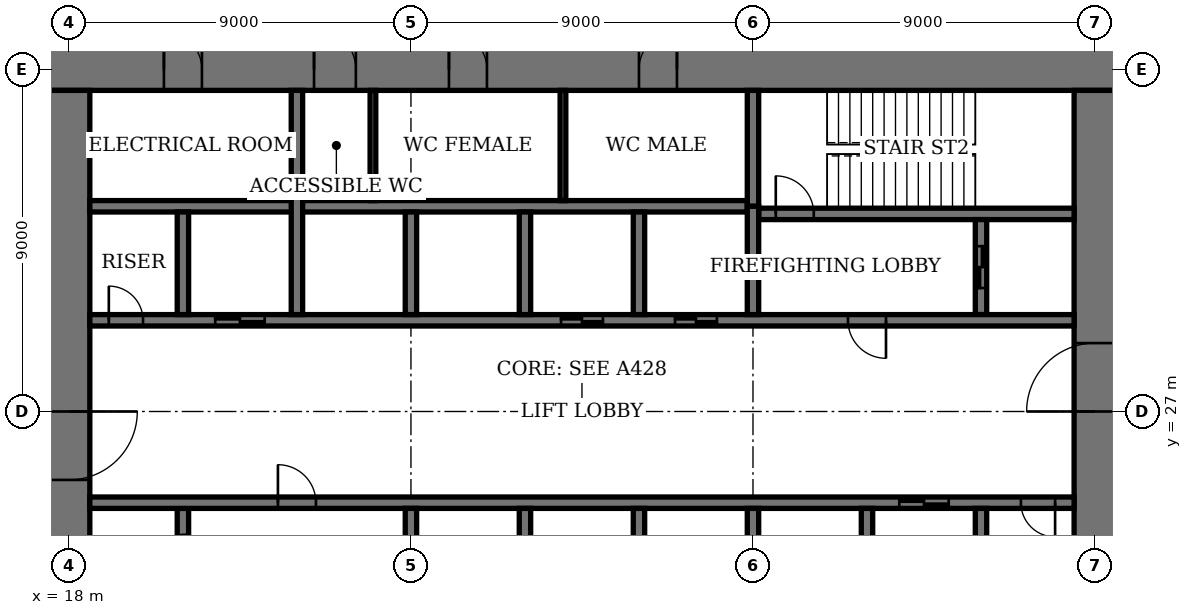
"""IFC4 building model, lengths in metres.
Left out: names, types, materials, properties, quantities, classifications, styles, units other than length and angle.
Written with IfcOpenShell. Run it as: python <this file> out.ifc"""

import sys

from ifc_helpers import new_model, si_unit, direction, frame, frame_2d, origin, place, context, subcontext, project, spatial, rectangle, extrude, element, fill, save


model = new_model("IFC4")
c1 = context("Model", 3, precision=1e-05, world=origin(), true_north=direction((0.0, 1.0)))
c2 = subcontext(c1, "Body", "Model", "MODEL_VIEW")
j1 = project(units=[si_unit("LENGTHUNIT", "METRE"), si_unit("PLANEANGLEUNIT", "RADIAN")], contexts=[c1])
p1 = place(None, origin())
s1 = spatial("IfcSite", under=j1, at=p1, CompositionType="ELEMENT")
p2 = place(p1, origin())
s2 = spatial("IfcBuilding", under=s1, at=p2, CompositionType="ELEMENT")
p3 = place(p2, frame((0.0, 0.0, 105.0)))
s3 = spatial("IfcBuildingStorey", under=s2, at=p3, CompositionType="ELEMENT", Elevation=105.0)
p4 = place(p3, frame((45.55, 36.0, 0.0), z_axis=(0.0, 0.0, 1.0), x_axis=(-1.0, 0.0, 0.0)))
e1 = element("IfcWall", 1, at=p4, inside=s3, PredefinedType="SHEAR", context=c2, shape_type="SweptSolid", body=[
    extrude(rectangle(XDim=28.1, YDim=1.1, at=frame_2d((14.05, 0.0))), origin(), (0.0, 0.0, 1.0), 4.0),
])
p5 = place(p4, frame((11.55, 0.0, 0.0)))
e2 = element("IfcOpeningElement", 2, at=p5, cuts=e1, PredefinedType="OPENING", context=c2, shape_type="SweptSolid", body=[
    extrude(rectangle(XDim=1.0, YDim=2.4, at=frame_2d((0.5, 1.2))), frame((0.0, 0.56, 0.0), z_axis=(0.0, -1.0, 0.0), x_axis=(1.0, 0.0, 0.0)), (0.0, 0.0, 1.0), 1.12),
])
p6 = place(p4, frame((16.55, 0.0, 0.0)))
e3 = element("IfcOpeningElement", 3, at=p6, cuts=e1, PredefinedType="OPENING", context=c2, shape_type="SweptSolid", body=[
    extrude(rectangle(XDim=1.0, YDim=2.4, at=frame_2d((0.5, 1.2))), frame((0.0, 0.56, 0.0), z_axis=(0.0, -1.0, 0.0), x_axis=(1.0, 0.0, 0.0)), (0.0, 0.0, 1.0), 1.12),
])
p7 = place(p4, frame((20.0, 0.0, 0.0)))
e4 = element("IfcOpeningElement", 4, at=p7, cuts=e1, PredefinedType="OPENING", context=c2, shape_type="SweptSolid", body=[
    extrude(rectangle(XDim=1.1, YDim=2.4, at=frame_2d((0.55, 1.2))), frame((0.0, 0.56, 0.0), z_axis=(0.0, -1.0, 0.0), x_axis=(1.0, 0.0, 0.0)), (0.0, 0.0, 1.0), 1.12),
])
p8 = place(p4, frame((24.05, 0.0, 0.0)))
e5 = element("IfcOpeningElement", 5, at=p8, cuts=e1, PredefinedType="OPENING", context=c2, shape_type="SweptSolid", body=[
    extrude(rectangle(XDim=1.0, YDim=2.4, at=frame_2d((0.5, 1.2))), frame((0.0, 0.56, 0.0), z_axis=(0.0, -1.0, 0.0), x_axis=(1.0, 0.0, 0.0)), (0.0, 0.0, 1.0), 1.12),
])
p9 = place(p3, frame((18.0, 35.45, 0.0), z_axis=(0.0, 0.0, 1.0), x_axis=(0.0, -1.0, 0.0)))
e6 = element("IfcWall", 6, at=p9, inside=s3, PredefinedType="SHEAR", context=c2, shape_type="SweptSolid", body=[
    extrude(rectangle(XDim=16.9, YDim=1.1, at=frame_2d((8.45, 0.0))), origin(), (0.0, 0.0, 1.0), 4.0),
])
p10 = place(p9, frame((8.45, 0.0, 0.0)))
e7 = element("IfcOpeningElement", 7, at=p10, cuts=e6, PredefinedType="OPENING", context=c2, shape_type="SweptSolid", body=[
    extrude(rectangle(XDim=1.8, YDim=2.4, at=frame_2d((0.9, 1.2))), frame((0.0, 0.56, 0.0), z_axis=(0.0, -1.0, 0.0), x_axis=(1.0, 0.0, 0.0)), (0.0, 0.0, 1.0), 1.12),
])
p11 = place(p3, frame((45.0, 18.55, 0.0), z_axis=(0.0, 0.0, 1.0), x_axis=(0.0, 1.0, 0.0)))
e8 = element("IfcWall", 8, at=p11, inside=s3, PredefinedType="SHEAR", context=c2, shape_type="SweptSolid", body=[
    extrude(rectangle(XDim=16.9, YDim=1.1, at=frame_2d((8.45, 0.0))), origin(), (0.0, 0.0, 1.0), 4.0),
])
p12 = place(p11, frame((8.45, 0.0, 0.0)))
e9 = element("IfcOpeningElement", 9, at=p12, cuts=e8, PredefinedType="OPENING", context=c2, shape_type="SweptSolid", body=[
    extrude(rectangle(XDim=1.8, YDim=2.4, at=frame_2d((0.9, 1.2))), frame((0.0, 0.56, 0.0), z_axis=(0.0, -1.0, 0.0), x_axis=(1.0, 0.0, 0.0)), (0.0, 0.0, 1.0), 1.12),
])
p13 = place(p3, frame((36.15, 32.2, 0.0), z_axis=(0.0, 0.0, 1.0), x_axis=(1.0, 0.0, 0.0)))
e10 = element("IfcWall", 10, at=p13, inside=s3, PredefinedType="SHEAR", context=c2, shape_type="SweptSolid", body=[
    extrude(rectangle(XDim=8.3, YDim=0.3, at=frame_2d((4.15, 0.0))), origin(), (0.0, 0.0, 1.0), 4.0),
])
p14 = place(p13, frame((0.45, 0.0, 0.0)))
e11 = element("IfcOpeningElement", 11, at=p14, cuts=e10, PredefinedType="OPENING", context=c2, shape_type="SweptSolid", body=[
    extrude(rectangle(XDim=1.0, YDim=2.4, at=frame_2d((0.5, 1.2))), frame((0.0, 0.16, 0.0), z_axis=(0.0, -1.0, 0.0), x_axis=(1.0, 0.0, 0.0)), (0.0, 0.0, 1.0), 0.32),
])
p15 = place(p3, frame((36.0, 32.4, 0.0), z_axis=(0.0, 0.0, 1.0), x_axis=(0.0, 1.0, 0.0)))
e12 = element("IfcWall", 12, at=p15, inside=s3, PredefinedType="SHEAR", context=c2, shape_type="SweptSolid", body=[
    extrude(rectangle(XDim=3.05, YDim=0.3, at=frame_2d((1.525, 0.0))), origin(), (0.0, 0.0, 1.0), 4.0),
])
p16 = place(p3, frame((21.0, 21.95, 0.0), z_axis=(0.0, 0.0, 1.0), x_axis=(0.0, 1.0, 0.0)))
e13 = element("IfcWall", 13, at=p16, inside=s3, PredefinedType="SHEAR", context=c2, shape_type="SweptSolid", body=[
    extrude(rectangle(XDim=2.5, YDim=0.3, at=frame_2d((1.25, 0.0))), origin(), (0.0, 0.0, 1.0), 4.0),
])
p17 = place(p16, frame((0.7, 0.0, 0.0)))
e14 = element("IfcOpeningElement", 14, at=p17, cuts=e13, PredefinedType="OPENING", context=c2, shape_type="SweptSolid", body=[
    extrude(rectangle(XDim=1.1, YDim=2.4, at=frame_2d((0.55, 1.2))), frame((0.0, 0.16, 0.0), z_axis=(0.0, -1.0, 0.0), x_axis=(1.0, 0.0, 0.0)), (0.0, 0.0, 1.0), 0.32),
])
p18 = place(p3, frame((42.0, 29.55, 0.0), z_axis=(0.0, 0.0, 1.0), x_axis=(0.0, 1.0, 0.0)))
e15 = element("IfcWall", 15, at=p18, inside=s3, PredefinedType="SHEAR", context=c2, shape_type="SweptSolid", body=[
    extrude(rectangle(XDim=2.5, YDim=0.3, at=frame_2d((1.25, 0.0))), origin(), (0.0, 0.0, 1.0), 4.0),
])
p19 = place(p18, frame((0.7, 0.0, 0.0)))
e16 = element("IfcOpeningElement", 16, at=p19, cuts=e15, PredefinedType="OPENING", context=c2, shape_type="SweptSolid", body=[
    extrude(rectangle(XDim=1.1, YDim=2.4, at=frame_2d((0.55, 1.2))), frame((0.0, 0.16, 0.0), z_axis=(0.0, -1.0, 0.0), x_axis=(1.0, 0.0, 0.0)), (0.0, 0.0, 1.0), 0.32),
])
p20 = place(p3, frame((18.55, 24.6, 0.0), z_axis=(0.0, 0.0, 1.0), x_axis=(1.0, 0.0, 0.0)))
e17 = element("IfcWall", 17, at=p20, inside=s3, PredefinedType="SHEAR", context=c2, shape_type="SweptSolid", body=[
    extrude(rectangle(XDim=25.9, YDim=0.3, at=frame_2d((12.95, 0.0))), origin(), (0.0, 0.0, 1.0), 4.0),
])
p21 = place(p20, frame((4.95, 0.0, 0.0)))
e18 = element("IfcOpeningElement", 18, at=p21, cuts=e17, PredefinedType="OPENING", context=c2, shape_type="SweptSolid", body=[
    extrude(rectangle(XDim=1.0, YDim=2.4, at=frame_2d((0.5, 1.2))), frame((0.0, 0.16, 0.0), z_axis=(0.0, -1.0, 0.0), x_axis=(1.0, 0.0, 0.0)), (0.0, 0.0, 1.0), 0.32),
])
p22 = place(p20, frame((24.5, 0.0, 0.0)))
e19 = element("IfcOpeningElement", 19, at=p22, cuts=e17, PredefinedType="OPENING", context=c2, shape_type="SweptSolid", body=[
    extrude(rectangle(XDim=0.9, YDim=2.1, at=frame_2d((0.45, 1.05))), frame((0.0, 0.16, 0.0), z_axis=(0.0, -1.0, 0.0), x_axis=(1.0, 0.0, 0.0)), (0.0, 0.0, 1.0), 0.32),
])
p23 = place(p20, frame((21.3, 0.0, 0.0)))
e20 = element("IfcOpeningElement", 20, at=p23, cuts=e17, PredefinedType="OPENING", context=c2, shape_type="SweptSolid", body=[
    extrude(rectangle(XDim=1.3, YDim=2.4, at=frame_2d((0.65, 1.2))), frame((0.0, 0.16, 0.0), z_axis=(0.0, -1.0, 0.0), x_axis=(1.0, 0.0, 0.0)), (0.0, 0.0, 1.0), 0.32),
])
p24 = place(p3, frame((18.55, 29.4, 0.0), z_axis=(0.0, 0.0, 1.0), x_axis=(1.0, 0.0, 0.0)))
e21 = element("IfcWall", 21, at=p24, inside=s3, PredefinedType="SHEAR", context=c2, shape_type="SweptSolid", body=[
    extrude(rectangle(XDim=25.9, YDim=0.3, at=frame_2d((12.95, 0.0))), origin(), (0.0, 0.0, 1.0), 4.0),
])
p25 = place(p24, frame((19.95, 0.0, 0.0)))
e22 = element("IfcOpeningElement", 22, at=p25, cuts=e21, PredefinedType="OPENING", context=c2, shape_type="SweptSolid", body=[
    extrude(rectangle(XDim=1.0, YDim=2.4, at=frame_2d((0.5, 1.2))), frame((0.0, 0.16, 0.0), z_axis=(0.0, -1.0, 0.0), x_axis=(1.0, 0.0, 0.0)), (0.0, 0.0, 1.0), 0.32),
])
p26 = place(p24, frame((0.5, 0.0, 0.0)))
e23 = element("IfcOpeningElement", 23, at=p26, cuts=e21, PredefinedType="OPENING", context=c2, shape_type="SweptSolid", body=[
    extrude(rectangle(XDim=0.9, YDim=2.1, at=frame_2d((0.45, 1.05))), frame((0.0, 0.16, 0.0), z_axis=(0.0, -1.0, 0.0), x_axis=(1.0, 0.0, 0.0)), (0.0, 0.0, 1.0), 0.32),
])
p27 = place(p24, frame((15.4, 0.0, 0.0)))
e24 = element("IfcOpeningElement", 24, at=p27, cuts=e21, PredefinedType="OPENING", context=c2, shape_type="SweptSolid", body=[
    extrude(rectangle(XDim=1.1, YDim=2.4, at=frame_2d((0.55, 1.2))), frame((0.0, 0.16, 0.0), z_axis=(0.0, -1.0, 0.0), x_axis=(1.0, 0.0, 0.0)), (0.0, 0.0, 1.0), 0.32),
])
p28 = place(p24, frame((12.4, 0.0, 0.0)))
e25 = element("IfcOpeningElement", 25, at=p28, cuts=e21, PredefinedType="OPENING", context=c2, shape_type="SweptSolid", body=[
    extrude(rectangle(XDim=1.1, YDim=2.4, at=frame_2d((0.55, 1.2))), frame((0.0, 0.16, 0.0), z_axis=(0.0, -1.0, 0.0), x_axis=(1.0, 0.0, 0.0)), (0.0, 0.0, 1.0), 0.32),
])
p29 = place(p24, frame((3.3, 0.0, 0.0)))
e26 = element("IfcOpeningElement", 26, at=p29, cuts=e21, PredefinedType="OPENING", context=c2, shape_type="SweptSolid", body=[
    extrude(rectangle(XDim=1.3, YDim=2.4, at=frame_2d((0.65, 1.2))), frame((0.0, 0.16, 0.0), z_axis=(0.0, -1.0, 0.0), x_axis=(1.0, 0.0, 0.0)), (0.0, 0.0, 1.0), 0.32),
])
p30 = place(p3, frame((18.55, 32.4, 0.0), z_axis=(0.0, 0.0, 1.0), x_axis=(1.0, 0.0, 0.0)))
e27 = element("IfcWall", 27, at=p30, inside=s3, PredefinedType="SHEAR", context=c2, shape_type="SweptSolid", body=[
    extrude(rectangle(XDim=17.3, YDim=0.3, at=frame_2d((8.65, 0.0))), origin(), (0.0, 0.0, 1.0), 4.0),
])
for number, where, z_axis, x_axis in (
    (28, (30.0, 21.75, 0.0), (0.0, 0.0, 1.0), (0.0, 1.0, 0.0)),
    (29, (33.0, 29.55, 0.0), (0.0, 0.0, 1.0), (0.0, 1.0, 0.0)),
    (30, (33.0, 21.75, 0.0), (0.0, 0.0, 1.0), (0.0, 1.0, 0.0)),
    (31, (30.0, 29.55, 0.0), (0.0, 0.0, 1.0), (0.0, 1.0, 0.0)),
    (32, (36.0, 21.75, 0.0), (0.0, 0.0, 1.0), (0.0, 1.0, 0.0)),
    (33, (27.0, 29.55, 0.0), (0.0, 0.0, 1.0), (0.0, 1.0, 0.0)),
):
    element("IfcWall", number, at=place(p3, frame(where, z_axis=z_axis, x_axis=x_axis)), inside=s3, PredefinedType="SHEAR", context=c2, shape_type="SweptSolid", body=[
        extrude(rectangle(XDim=2.7, YDim=0.3, at=frame_2d((1.35, 0.0))), origin(), (0.0, 0.0, 1.0), 4.0),
    ])
for number, where, z_axis, x_axis in (
    (34, (39.0, 18.55, 0.0), (0.0, 0.0, 1.0), (0.0, 1.0, 0.0)),
    (35, (24.0, 29.55, 0.0), (0.0, 0.0, 1.0), (0.0, 1.0, 0.0)),
):
    element("IfcWall", number, at=place(p3, frame(where, z_axis=z_axis, x_axis=x_axis)), inside=s3, PredefinedType="SHEAR", context=c2, shape_type="SweptSolid", body=[
        extrude(rectangle(XDim=5.9, YDim=0.3, at=frame_2d((2.95, 0.0))), origin(), (0.0, 0.0, 1.0), 4.0),
    ])
for number, where, z_axis, x_axis in (
    (36, (42.0, 21.75, 0.0), (0.0, 0.0, 1.0), (0.0, 1.0, 0.0)),
    (37, (21.0, 29.55, 0.0), (0.0, 0.0, 1.0), (0.0, 1.0, 0.0)),
):
    element("IfcWall", number, at=place(p3, frame(where, z_axis=z_axis, x_axis=x_axis)), inside=s3, PredefinedType="SHEAR", context=c2, shape_type="SweptSolid", body=[
        extrude(rectangle(XDim=2.7, YDim=0.3, at=frame_2d((1.35, 0.0))), origin(), (0.0, 0.0, 1.0), 4.0),
    ])
for number, where, z_axis, x_axis in (
    (38, (27.0, 21.6, 0.0), (0.0, 0.0, 1.0), (0.0, 1.0, 0.0)),
    (39, (36.0, 29.55, 0.0), (0.0, 0.0, 1.0), (0.0, 1.0, 0.0)),
):
    element("IfcWall", number, at=place(p3, frame(where, z_axis=z_axis, x_axis=x_axis)), inside=s3, PredefinedType="SHEAR", context=c2, shape_type="SweptSolid", body=[
        extrude(rectangle(XDim=2.85, YDim=0.3, at=frame_2d((1.425, 0.0))), origin(), (0.0, 0.0, 1.0), 4.0),
    ])
for number, where, z_axis, x_axis in (
    (40, (31.0, 32.55, 0.0), (0.0, 0.0, 1.0), (0.0, 1.0, 0.0)),
    (41, (26.0, 32.55, 0.0), (0.0, 0.0, 1.0), (0.0, 1.0, 0.0)),
):
    element("IfcWall", number, at=place(p3, frame(where, z_axis=z_axis, x_axis=x_axis)), inside=s3, PredefinedType="PARTITIONING", context=c2, shape_type="SweptSolid", body=[
        extrude(rectangle(XDim=2.9, YDim=0.15, at=frame_2d((1.45, 0.0))), origin(), (0.0, 0.0, 1.0), 3.75),
    ])
p31 = place(p10, origin())
e42 = element("IfcDoor", 42, at=p31, inside=s3, OperationType="DOUBLE_DOOR_DOUBLE_SWING", PredefinedType="DOOR", context=c2, shape_type="SweptSolid", body=[
    extrude(rectangle(XDim=1.8, YDim=2.4, at=frame_2d((0.9, 1.2))), frame((0.0, 0.03, 0.0), z_axis=(0.0, -1.0, 0.0), x_axis=(1.0, 0.0, 0.0)), (0.0, 0.0, 1.0), 0.06),
    extrude(rectangle(XDim=0.04, YDim=2.4, at=frame_2d((0.02, 1.2))), frame((0.0, 0.55, 0.0), z_axis=(0.0, -1.0, 0.0), x_axis=(1.0, 0.0, 0.0)), (0.0, 0.0, 1.0), 1.1),
    extrude(rectangle(XDim=0.04, YDim=2.4, at=frame_2d((1.78, 1.2))), frame((0.0, 0.55, 0.0), z_axis=(0.0, -1.0, 0.0), x_axis=(1.0, 0.0, 0.0)), (0.0, 0.0, 1.0), 1.1),
    extrude(rectangle(XDim=1.8, YDim=0.04, at=frame_2d((0.9, 2.38))), frame((0.0, 0.55, 0.0), z_axis=(0.0, -1.0, 0.0), x_axis=(1.0, 0.0, 0.0)), (0.0, 0.0, 1.0), 1.1),
])
fill(e7, e42)
p32 = place(p12, origin())
e43 = element("IfcDoor", 43, at=p32, inside=s3, OperationType="DOUBLE_DOOR_DOUBLE_SWING", PredefinedType="DOOR", context=c2, shape_type="SweptSolid", body=[
    extrude(rectangle(XDim=1.8, YDim=2.4, at=frame_2d((0.9, 1.2))), frame((0.0, 0.03, 0.0), z_axis=(0.0, -1.0, 0.0), x_axis=(1.0, 0.0, 0.0)), (0.0, 0.0, 1.0), 0.06),
    extrude(rectangle(XDim=0.04, YDim=2.4, at=frame_2d((0.02, 1.2))), frame((0.0, 0.55, 0.0), z_axis=(0.0, -1.0, 0.0), x_axis=(1.0, 0.0, 0.0)), (0.0, 0.0, 1.0), 1.1),
    extrude(rectangle(XDim=0.04, YDim=2.4, at=frame_2d((1.78, 1.2))), frame((0.0, 0.55, 0.0), z_axis=(0.0, -1.0, 0.0), x_axis=(1.0, 0.0, 0.0)), (0.0, 0.0, 1.0), 1.1),
    extrude(rectangle(XDim=1.8, YDim=0.04, at=frame_2d((0.9, 2.38))), frame((0.0, 0.55, 0.0), z_axis=(0.0, -1.0, 0.0), x_axis=(1.0, 0.0, 0.0)), (0.0, 0.0, 1.0), 1.1),
])
fill(e9, e43)
p33 = place(p5, origin())
e44 = element("IfcDoor", 44, at=p33, inside=s3, OperationType="SINGLE_SWING_LEFT", PredefinedType="DOOR", context=c2, shape_type="SweptSolid", body=[
    extrude(rectangle(XDim=1.0, YDim=2.4, at=frame_2d((0.5, 1.2))), frame((0.0, 0.025, 0.0), z_axis=(0.0, -1.0, 0.0), x_axis=(1.0, 0.0, 0.0)), (0.0, 0.0, 1.0), 0.05),
    extrude(rectangle(XDim=0.04, YDim=2.4, at=frame_2d((0.02, 1.2))), frame((0.0, 0.4, 0.0), z_axis=(0.0, -1.0, 0.0), x_axis=(1.0, 0.0, 0.0)), (0.0, 0.0, 1.0), 0.8),
    extrude(rectangle(XDim=0.04, YDim=2.4, at=frame_2d((0.98, 1.2))), frame((0.0, 0.4, 0.0), z_axis=(0.0, -1.0, 0.0), x_axis=(1.0, 0.0, 0.0)), (0.0, 0.0, 1.0), 0.8),
    extrude(rectangle(XDim=1.0, YDim=0.04, at=frame_2d((0.5, 2.38))), frame((0.0, 0.4, 0.0), z_axis=(0.0, -1.0, 0.0), x_axis=(1.0, 0.0, 0.0)), (0.0, 0.0, 1.0), 0.8),
])
fill(e2, e44)
p34 = place(p6, origin())
e45 = element("IfcDoor", 45, at=p34, inside=s3, OperationType="SINGLE_SWING_RIGHT", PredefinedType="DOOR", context=c2, shape_type="SweptSolid", body=[
    extrude(rectangle(XDim=1.0, YDim=2.4, at=frame_2d((0.5, 1.2))), frame((0.0, 0.025, 0.0), z_axis=(0.0, -1.0, 0.0), x_axis=(1.0, 0.0, 0.0)), (0.0, 0.0, 1.0), 0.05),
    extrude(rectangle(XDim=0.04, YDim=2.4, at=frame_2d((0.02, 1.2))), frame((0.0, 0.4, 0.0), z_axis=(0.0, -1.0, 0.0), x_axis=(1.0, 0.0, 0.0)), (0.0, 0.0, 1.0), 0.8),
    extrude(rectangle(XDim=0.04, YDim=2.4, at=frame_2d((0.98, 1.2))), frame((0.0, 0.4, 0.0), z_axis=(0.0, -1.0, 0.0), x_axis=(1.0, 0.0, 0.0)), (0.0, 0.0, 1.0), 0.8),
    extrude(rectangle(XDim=1.0, YDim=0.04, at=frame_2d((0.5, 2.38))), frame((0.0, 0.4, 0.0), z_axis=(0.0, -1.0, 0.0), x_axis=(1.0, 0.0, 0.0)), (0.0, 0.0, 1.0), 0.8),
])
fill(e3, e45)
p35 = place(p7, origin())
e46 = element("IfcDoor", 46, at=p35, inside=s3, OperationType="SINGLE_SWING_RIGHT", PredefinedType="DOOR", context=c2, shape_type="SweptSolid", body=[
    extrude(rectangle(XDim=1.1, YDim=2.4, at=frame_2d((0.55, 1.2))), frame((0.0, 0.025, 0.0), z_axis=(0.0, -1.0, 0.0), x_axis=(1.0, 0.0, 0.0)), (0.0, 0.0, 1.0), 0.05),
    extrude(rectangle(XDim=0.04, YDim=2.4, at=frame_2d((0.02, 1.2))), frame((0.0, 0.44, 0.0), z_axis=(0.0, -1.0, 0.0), x_axis=(1.0, 0.0, 0.0)), (0.0, 0.0, 1.0), 0.88),
    extrude(rectangle(XDim=0.04, YDim=2.4, at=frame_2d((1.08, 1.2))), frame((0.0, 0.44, 0.0), z_axis=(0.0, -1.0, 0.0), x_axis=(1.0, 0.0, 0.0)), (0.0, 0.0, 1.0), 0.88),
    extrude(rectangle(XDim=1.1, YDim=0.04, at=frame_2d((0.55, 2.38))), frame((0.0, 0.44, 0.0), z_axis=(0.0, -1.0, 0.0), x_axis=(1.0, 0.0, 0.0)), (0.0, 0.0, 1.0), 0.88),
])
fill(e4, e46)
p36 = place(p8, origin())
e47 = element("IfcDoor", 47, at=p36, inside=s3, OperationType="SINGLE_SWING_RIGHT", PredefinedType="DOOR", context=c2, shape_type="SweptSolid", body=[
    extrude(rectangle(XDim=1.0, YDim=2.4, at=frame_2d((0.5, 1.2))), frame((0.0, 0.025, 0.0), z_axis=(0.0, -1.0, 0.0), x_axis=(1.0, 0.0, 0.0)), (0.0, 0.0, 1.0), 0.05),
    extrude(rectangle(XDim=0.04, YDim=2.4, at=frame_2d((0.02, 1.2))), frame((0.0, 0.4, 0.0), z_axis=(0.0, -1.0, 0.0), x_axis=(1.0, 0.0, 0.0)), (0.0, 0.0, 1.0), 0.8),
    extrude(rectangle(XDim=0.04, YDim=2.4, at=frame_2d((0.98, 1.2))), frame((0.0, 0.4, 0.0), z_axis=(0.0, -1.0, 0.0), x_axis=(1.0, 0.0, 0.0)), (0.0, 0.0, 1.0), 0.8),
    extrude(rectangle(XDim=1.0, YDim=0.04, at=frame_2d((0.5, 2.38))), frame((0.0, 0.4, 0.0), z_axis=(0.0, -1.0, 0.0), x_axis=(1.0, 0.0, 0.0)), (0.0, 0.0, 1.0), 0.8),
])
fill(e5, e47)
p37 = place(p14, origin())
e48 = element("IfcDoor", 48, at=p37, inside=s3, OperationType="SINGLE_SWING_RIGHT", PredefinedType="DOOR", context=c2, shape_type="SweptSolid", body=[
    extrude(rectangle(XDim=1.0, YDim=2.4, at=frame_2d((0.5, 1.2))), frame((0.0, 0.03, 0.0), z_axis=(0.0, -1.0, 0.0), x_axis=(1.0, 0.0, 0.0)), (0.0, 0.0, 1.0), 0.06),
])
fill(e11, e48)
p38 = place(p21, origin())
e49 = element("IfcDoor", 49, at=p38, inside=s3, OperationType="SINGLE_SWING_RIGHT", PredefinedType="DOOR", context=c2, shape_type="SweptSolid", body=[
    extrude(rectangle(XDim=1.0, YDim=2.4, at=frame_2d((0.5, 1.2))), frame((0.0, 0.03, 0.0), z_axis=(0.0, -1.0, 0.0), x_axis=(1.0, 0.0, 0.0)), (0.0, 0.0, 1.0), 0.06),
])
fill(e18, e49)
p39 = place(p25, origin())
e50 = element("IfcDoor", 50, at=p39, inside=s3, OperationType="SINGLE_SWING_RIGHT", PredefinedType="DOOR", context=c2, shape_type="SweptSolid", body=[
    extrude(rectangle(XDim=1.0, YDim=2.4, at=frame_2d((0.5, 1.2))), frame((0.0, 0.03, 0.0), z_axis=(0.0, -1.0, 0.0), x_axis=(1.0, 0.0, 0.0)), (0.0, 0.0, 1.0), 0.06),
])
fill(e22, e50)
p40 = place(p22, origin())
e51 = element("IfcDoor", 51, at=p40, inside=s3, OperationType="SINGLE_SWING_RIGHT", PredefinedType="DOOR", context=c2, shape_type="SweptSolid", body=[
    extrude(rectangle(XDim=0.9, YDim=2.1, at=frame_2d((0.45, 1.05))), frame((0.0, 0.03, 0.0), z_axis=(0.0, -1.0, 0.0), x_axis=(1.0, 0.0, 0.0)), (0.0, 0.0, 1.0), 0.06),
])
fill(e19, e51)
p41 = place(p26, origin())
e52 = element("IfcDoor", 52, at=p41, inside=s3, OperationType="SINGLE_SWING_RIGHT", PredefinedType="DOOR", context=c2, shape_type="SweptSolid", body=[
    extrude(rectangle(XDim=0.9, YDim=2.1, at=frame_2d((0.45, 1.05))), frame((0.0, 0.03, 0.0), z_axis=(0.0, -1.0, 0.0), x_axis=(1.0, 0.0, 0.0)), (0.0, 0.0, 1.0), 0.06),
])
fill(e23, e52)
p42 = place(p27, origin())
e53 = element("IfcDoor", 53, at=p42, inside=s3, OperationType="DOUBLE_DOOR_SLIDING", PredefinedType="DOOR", context=c2, shape_type="SweptSolid", body=[
    extrude(rectangle(XDim=1.1, YDim=2.4, at=frame_2d((0.55, 1.2))), frame((0.0, 0.02, 0.0), z_axis=(0.0, -1.0, 0.0), x_axis=(1.0, 0.0, 0.0)), (0.0, 0.0, 1.0), 0.04),
])
fill(e24, e53)
p43 = place(p28, origin())
e54 = element("IfcDoor", 54, at=p43, inside=s3, OperationType="DOUBLE_DOOR_SLIDING", PredefinedType="DOOR", context=c2, shape_type="SweptSolid", body=[
    extrude(rectangle(XDim=1.1, YDim=2.4, at=frame_2d((0.55, 1.2))), frame((0.0, 0.02, 0.0), z_axis=(0.0, -1.0, 0.0), x_axis=(1.0, 0.0, 0.0)), (0.0, 0.0, 1.0), 0.04),
])
fill(e25, e54)
p44 = place(p23, origin())
e55 = element("IfcDoor", 55, at=p44, inside=s3, OperationType="DOUBLE_DOOR_SLIDING", PredefinedType="DOOR", context=c2, shape_type="SweptSolid", body=[
    extrude(rectangle(XDim=1.3, YDim=2.4, at=frame_2d((0.65, 1.2))), frame((0.0, 0.02, 0.0), z_axis=(0.0, -1.0, 0.0), x_axis=(1.0, 0.0, 0.0)), (0.0, 0.0, 1.0), 0.04),
])
fill(e20, e55)
p45 = place(p29, origin())
e56 = element("IfcDoor", 56, at=p45, inside=s3, OperationType="DOUBLE_DOOR_SLIDING", PredefinedType="DOOR", context=c2, shape_type="SweptSolid", body=[
    extrude(rectangle(XDim=1.3, YDim=2.4, at=frame_2d((0.65, 1.2))), frame((0.0, 0.02, 0.0), z_axis=(0.0, -1.0, 0.0), x_axis=(1.0, 0.0, 0.0)), (0.0, 0.0, 1.0), 0.04),
])
fill(e26, e56)
p46 = place(p19, origin())
e57 = element("IfcDoor", 57, at=p46, inside=s3, OperationType="DOUBLE_DOOR_SLIDING", PredefinedType="DOOR", context=c2, shape_type="SweptSolid", body=[
    extrude(rectangle(XDim=1.1, YDim=2.4, at=frame_2d((0.55, 1.2))), frame((0.0, 0.03, 0.0), z_axis=(0.0, -1.0, 0.0), x_axis=(1.0, 0.0, 0.0)), (0.0, 0.0, 1.0), 0.06),
])
fill(e16, e57)
save(model, sys.argv[1])
